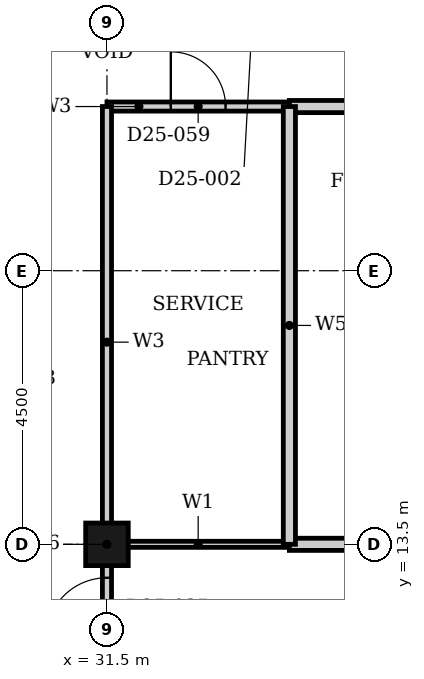
"""IFC4 building model, lengths in metres.
Left out: names, types, materials, properties, quantities, classifications, styles, units other than length and angle.
Written with IfcOpenShell. Run it as: python <this file> out.ifc"""

import sys

from ifc_helpers import new_model, si_unit, direction, frame, frame_2d, origin, origin_2d, place, context, subcontext, project, spatial, rectangle, hollow_rectangle, extrude, element, fill, save


model = new_model("IFC4")
c1 = context("Model", 3, precision=1e-05, world=origin(), true_north=direction((0.0, 1.0)))
c2 = subcontext(c1, "Body", "Model", "MODEL_VIEW")
j1 = project(units=[si_unit("LENGTHUNIT", "METRE"), si_unit("PLANEANGLEUNIT", "RADIAN")], contexts=[c1])
p1 = place(None, origin())
s1 = spatial("IfcSite", under=j1, at=p1, CompositionType="ELEMENT")
p2 = place(p1, origin())
s2 = spatial("IfcBuilding", under=s1, at=p2, CompositionType="ELEMENT")
p3 = place(p2, frame((0.0, 0.0, 104.4)))
s3 = spatial("IfcBuildingStorey", under=s2, at=p3, CompositionType="ELEMENT", Elevation=104.4)
p4 = place(p3, frame((31.5, 13.5, 0.0), z_axis=(0.0, 0.0, 1.0), x_axis=(1.0, 0.0, 0.0)))
e1 = element("IfcColumn", 1, at=p4, inside=s3, PredefinedType="COLUMN", context=c2, shape_type="SweptSolid", body=[
    extrude(hollow_rectangle(XDim=0.7, YDim=0.7, WallThickness=0.022, at=origin_2d()), origin(), (0.0, 0.0, 1.0), 3.6),
])
p5 = place(p3, frame((31.5, 20.7, 0.0), z_axis=(0.0, 0.0, 1.0), x_axis=(1.0, 0.0, 0.0)))
e2 = element("IfcWall", 2, at=p5, inside=s3, PredefinedType="PARTITIONING", context=c2, shape_type="SweptSolid", body=[
    extrude(rectangle(XDim=3.0, YDim=0.15, at=frame_2d((1.5, 0.0))), origin(), (0.0, 0.0, 1.0), 3.3),
])
p6 = place(p5, frame((1.05, 0.0, 0.0)))
e3 = element("IfcOpeningElement", 3, at=p6, cuts=e2, PredefinedType="OPENING", context=c2, shape_type="SweptSolid", body=[
    extrude(rectangle(XDim=0.9, YDim=2.1, at=frame_2d((0.45, 1.05))), frame((0.0, 0.085, 0.0), z_axis=(0.0, -1.0, 0.0), x_axis=(1.0, 0.0, 0.0)), (0.0, 0.0, 1.0), 0.17),
])
p7 = place(p3, frame((31.5, 4.5, 0.0), z_axis=(0.0, 0.0, 1.0), x_axis=(0.0, 1.0, 0.0)))
e4 = element("IfcWall", 4, at=p7, inside=s3, PredefinedType="PARTITIONING", context=c2, shape_type="SweptSolid", body=[
    extrude(rectangle(XDim=16.2, YDim=0.15, at=frame_2d((8.1, 0.0))), origin(), (0.0, 0.0, 1.0), 2.58),
])
p8 = place(p7, frame((7.45, 0.0, 0.0)))
e5 = element("IfcOpeningElement", 5, at=p8, cuts=e4, PredefinedType="OPENING", context=c2, shape_type="SweptSolid", body=[
    extrude(rectangle(XDim=1.0, YDim=2.1, at=frame_2d((0.5, 1.05))), frame((0.0, 0.085, 0.0), z_axis=(0.0, -1.0, 0.0), x_axis=(1.0, 0.0, 0.0)), (0.0, 0.0, 1.0), 0.17),
])
p9 = place(p7, frame((2.95, 0.0, 0.0)))
e6 = element("IfcOpeningElement", 6, at=p9, cuts=e4, PredefinedType="OPENING", context=c2, shape_type="SweptSolid", body=[
    extrude(rectangle(XDim=1.0, YDim=2.1, at=frame_2d((0.5, 1.05))), frame((0.0, 0.085, 0.0), z_axis=(0.0, -1.0, 0.0), x_axis=(1.0, 0.0, 0.0)), (0.0, 0.0, 1.0), 0.17),
])
p10 = place(p3, frame((31.5, 13.5, 0.0), z_axis=(0.0, 0.0, 1.0), x_axis=(1.0, 0.0, 0.0)))
e7 = element("IfcWall", 7, at=p10, inside=s3, PredefinedType="PARTITIONING", context=c2, shape_type="SweptSolid", body=[
    extrude(rectangle(XDim=3.0, YDim=0.1, at=frame_2d((1.5, 0.0))), origin(), (0.0, 0.0, 1.0), 2.38),
])
p11 = place(p3, frame((34.5, 13.5, 0.0), z_axis=(0.0, 0.0, 1.0), x_axis=(1.0, 0.0, 0.0)))
e8 = element("IfcWall", 8, at=p11, inside=s3, PredefinedType="PARTITIONING", context=c2, shape_type="SweptSolid", body=[
    extrude(rectangle(XDim=6.19, YDim=0.2, at=frame_2d((3.095, 0.0))), origin(), (0.0, 0.0, 1.0), 2.38),
])
p12 = place(p3, frame((34.5, 20.7, 0.0), z_axis=(0.0, 0.0, 1.0), x_axis=(1.0, 0.0, 0.0)))
e9 = element("IfcWall", 9, at=p12, inside=s3, PredefinedType="PARTITIONING", context=c2, shape_type="SweptSolid", body=[
    extrude(rectangle(XDim=6.0, YDim=0.2, at=frame_2d((3.0, 0.0))), origin(), (0.0, 0.0, 1.0), 3.3),
])
p13 = place(p12, frame((2.55, 0.0, 0.0)))
e10 = element("IfcOpeningElement", 10, at=p13, cuts=e9, PredefinedType="OPENING", context=c2, shape_type="SweptSolid", body=[
    extrude(rectangle(XDim=0.9, YDim=2.1, at=frame_2d((0.45, 1.05))), frame((0.0, 0.11, 0.0), z_axis=(0.0, -1.0, 0.0), x_axis=(1.0, 0.0, 0.0)), (0.0, 0.0, 1.0), 0.22),
])
p14 = place(p3, frame((34.5, 13.5, 0.0), z_axis=(0.0, 0.0, 1.0), x_axis=(0.0, 1.0, 0.0)))
e11 = element("IfcWall", 11, at=p14, inside=s3, PredefinedType="PARTITIONING", context=c2, shape_type="SweptSolid", body=[
    extrude(rectangle(XDim=7.2, YDim=0.2, at=frame_2d((3.6, 0.0))), origin(), (0.0, 0.0, 1.0), 3.3),
])
p15 = place(p8, origin())
e12 = element("IfcDoor", 12, at=p15, inside=s3, OperationType="SINGLE_SWING_RIGHT", PredefinedType="DOOR", context=c2, shape_type="SweptSolid", body=[
    extrude(rectangle(XDim=1.0, YDim=2.1, at=frame_2d((0.5, 1.05))), frame((0.0, 0.025, 0.0), z_axis=(0.0, -1.0, 0.0), x_axis=(1.0, 0.0, 0.0)), (0.0, 0.0, 1.0), 0.05),
])
fill(e5, e12)
p16 = place(p6, origin())
e13 = element("IfcDoor", 13, at=p16, inside=s3, OperationType="SINGLE_SWING_RIGHT", PredefinedType="DOOR", context=c2, shape_type="SweptSolid", body=[
    extrude(rectangle(XDim=0.9, YDim=2.1, at=frame_2d((0.45, 1.05))), frame((0.0, 0.025, 0.0), z_axis=(0.0, -1.0, 0.0), x_axis=(1.0, 0.0, 0.0)), (0.0, 0.0, 1.0), 0.05),
])
fill(e3, e13)
save(model, sys.argv[1])
